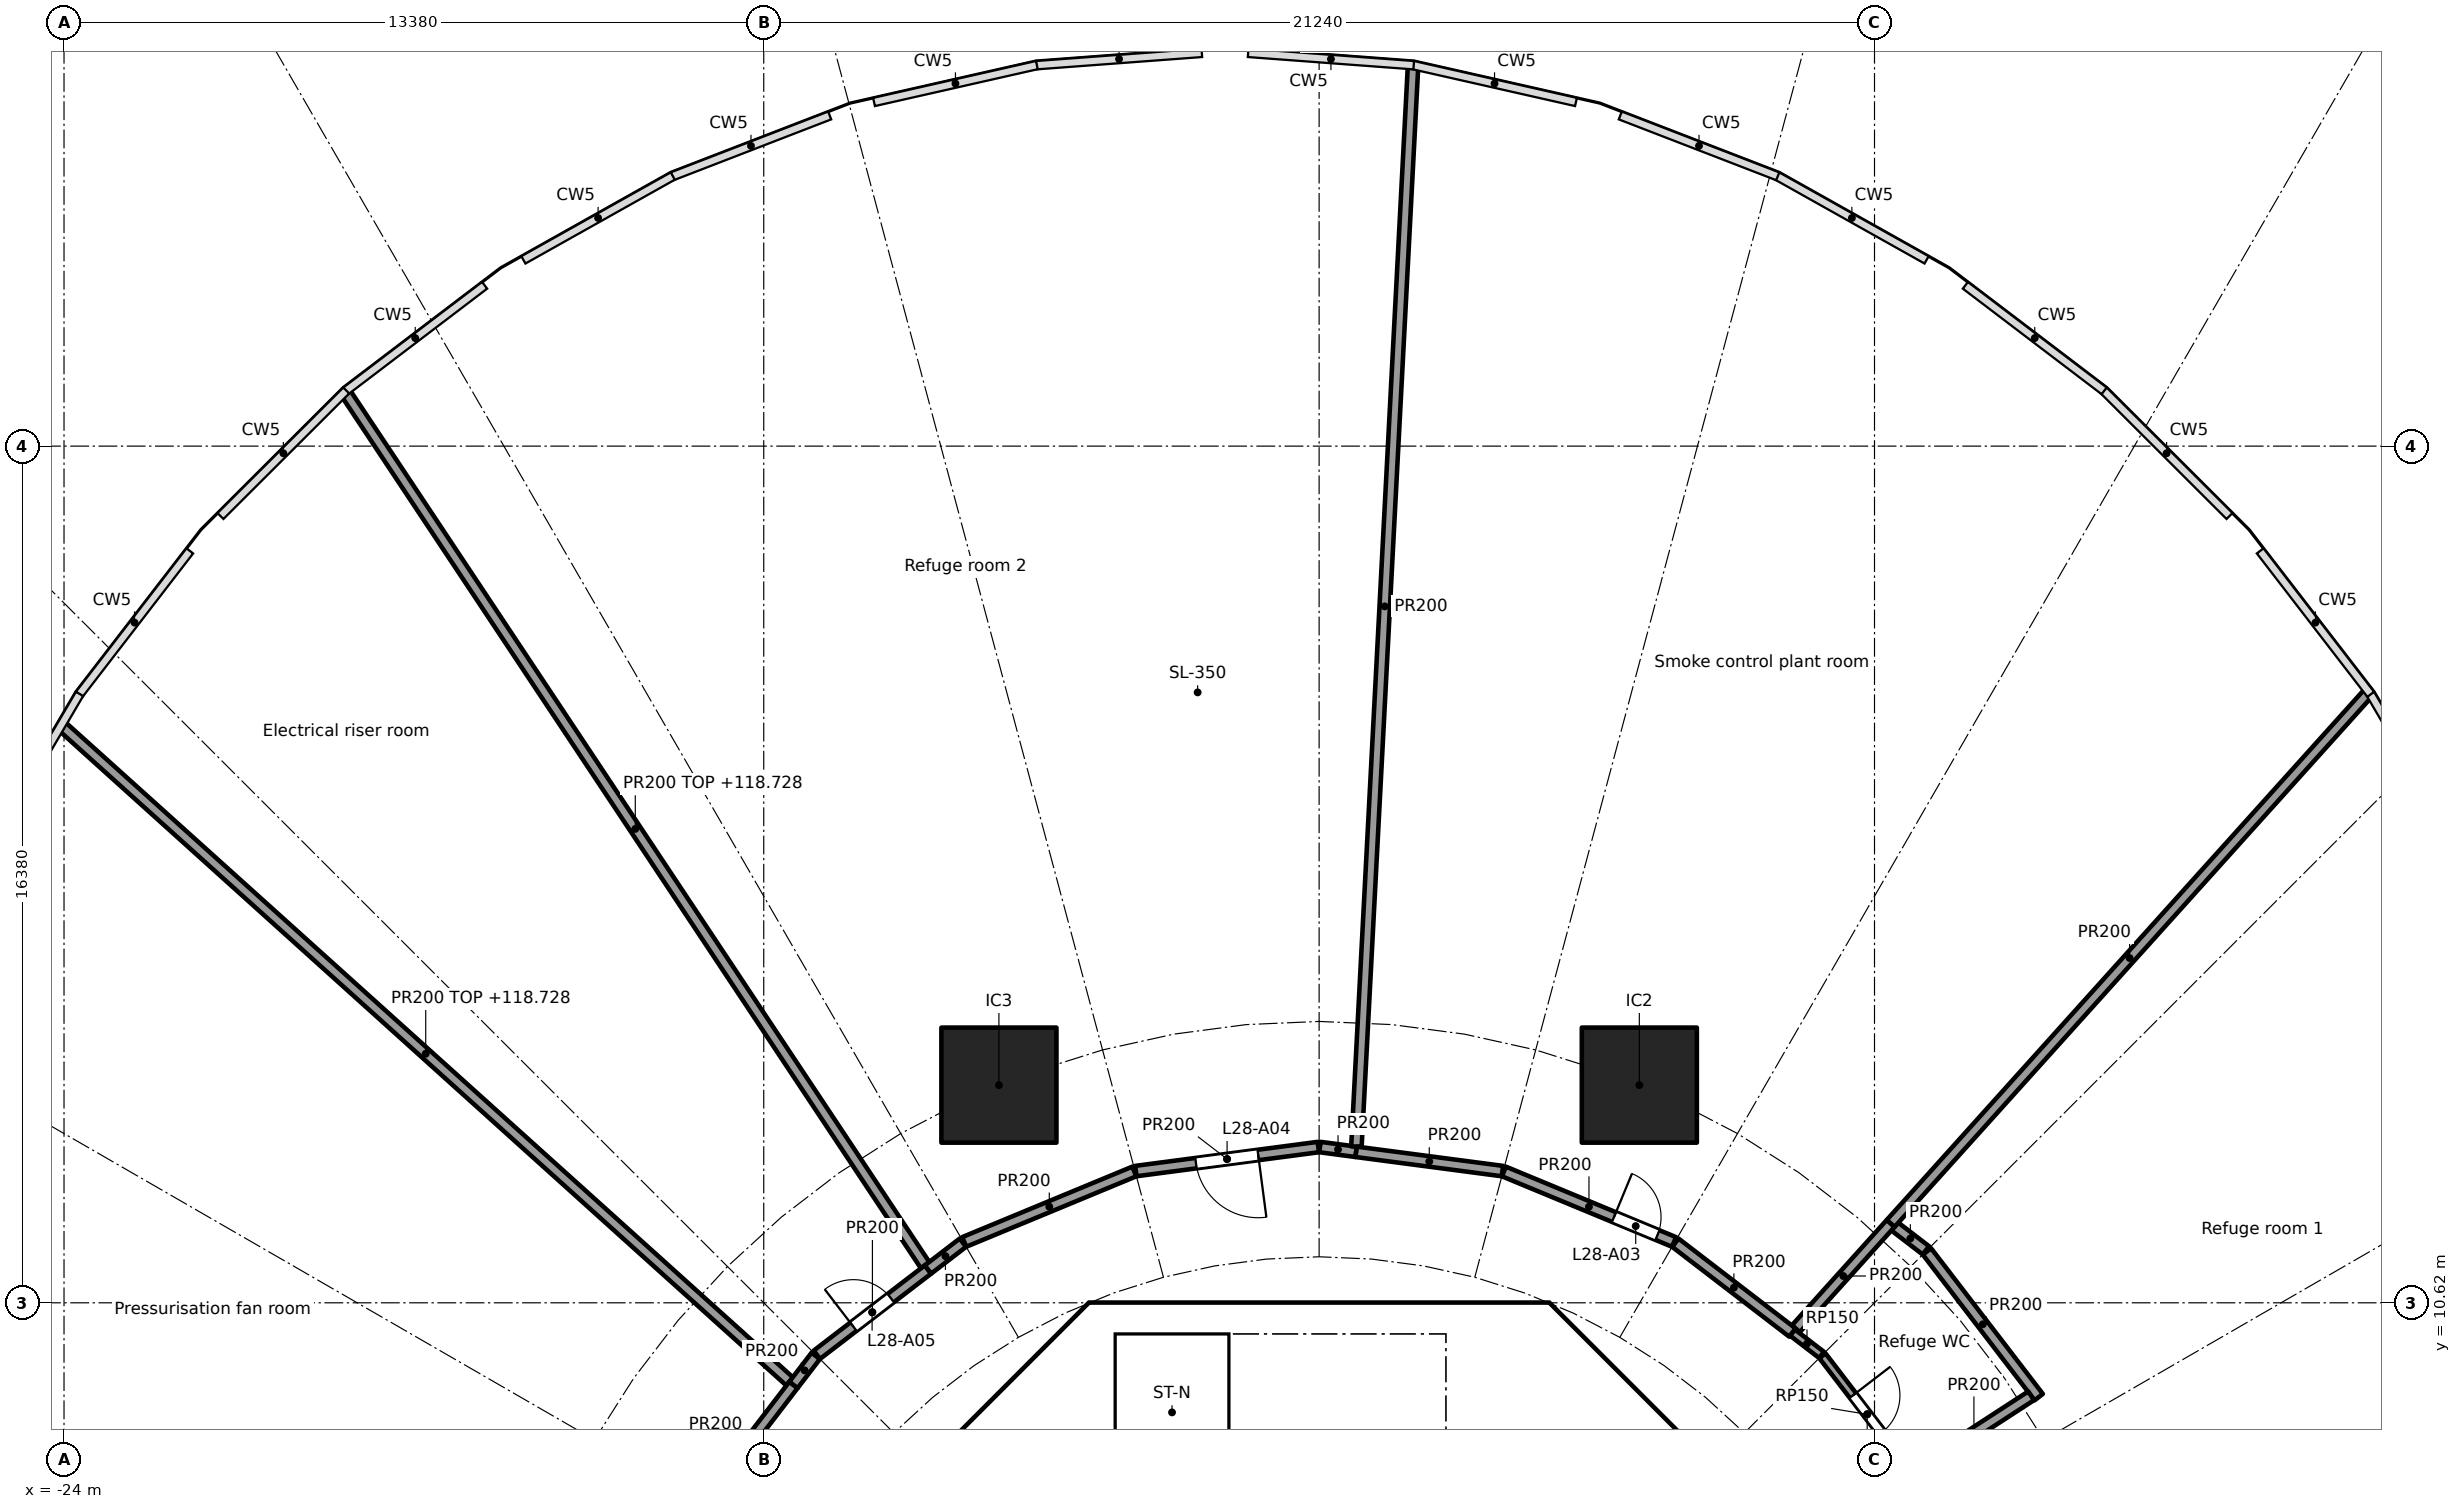
"""IFC4 building model, lengths in metres.
Left out: names, types, materials, properties, quantities, classifications, styles, units other than length and angle.
Written with IfcOpenShell. Run it as: python <this file> out.ifc"""

import sys

from ifc_helpers import new_model, si_unit, direction, frame, frame_2d, origin, origin_2d, place, context, subcontext, project, spatial, polyline, rectangle, outline, extrude, element, fill, save


model = new_model("IFC4")
c1 = context("Model", 3, precision=1e-05, world=origin(), true_north=direction((0.0, 1.0)))
c2 = subcontext(c1, "Body", "Model", "MODEL_VIEW")
j1 = project(units=[si_unit("LENGTHUNIT", "METRE"), si_unit("PLANEANGLEUNIT", "RADIAN")], contexts=[c1])
p1 = place(None, origin())
s1 = spatial("IfcSite", under=j1, at=p1, CompositionType="ELEMENT")
p2 = place(p1, origin())
s2 = spatial("IfcBuilding", under=s1, at=p2, CompositionType="ELEMENT")
p3 = place(p2, frame((0.0, 0.0, 114.0)))
s3 = spatial("IfcBuildingStorey", under=s2, at=p3, CompositionType="ELEMENT", Elevation=114.0)
for number, where, z_axis, x_axis in (
    (1, (6.123, 14.782, 0.0), (0.0, 0.0, 1.0), (1.0, 0.0, 0.0)),
    (2, (-6.123, 14.782, 0.0), (0.0, 0.0, 1.0), (1.0, 0.0, 0.0)),
):
    element("IfcColumn", number, at=place(p3, frame(where, z_axis=z_axis, x_axis=x_axis)), inside=s3, PredefinedType="COLUMN", context=c2, shape_type="SweptSolid", body=[
        extrude(rectangle(XDim=2.2, YDim=2.2, at=origin_2d()), origin(), (0.0, 0.0, 1.0), 5.6),
    ])
p4 = place(p3, frame((9.988, 4.613, 0.0), z_axis=(0.0, 0.0, 1.0), x_axis=(-0.707106781187, 0.707106781187, 0.0)))
e3 = element("IfcWall", 3, at=p4, inside=s3, PredefinedType="SHEAR", context=c2, shape_type="SweptSolid", body=[
    extrude(rectangle(XDim=7.602, YDim=0.6, at=frame_2d((3.801, 0.0))), origin(), (0.0, 0.0, 1.0), 5.34),
])
p5 = place(p4, frame((3.201, 0.0, 0.0)))
e4 = element("IfcOpeningElement", 4, at=p5, cuts=e3, PredefinedType="OPENING", context=c2, shape_type="SweptSolid", body=[
    extrude(rectangle(XDim=1.2, YDim=2.1, at=frame_2d((0.6, 1.05))), frame((0.0, 0.31, 0.0), z_axis=(0.0, -1.0, 0.0), x_axis=(1.0, 0.0, 0.0)), (0.0, 0.0, 1.0), 0.62),
])
p6 = place(p3, frame((-4.613, 9.988, 0.0), z_axis=(0.0, 0.0, 1.0), x_axis=(-0.707106781187, -0.707106781187, 0.0)))
e5 = element("IfcWall", 5, at=p6, inside=s3, PredefinedType="SHEAR", context=c2, shape_type="SweptSolid", body=[
    extrude(rectangle(XDim=7.602, YDim=0.6, at=frame_2d((3.801, 0.0))), origin(), (0.0, 0.0, 1.0), 5.34),
])
p7 = place(p6, frame((0.351, 0.0, 0.0)))
e6 = element("IfcOpeningElement", 6, at=p7, cuts=e5, PredefinedType="OPENING", context=c2, shape_type="SweptSolid", body=[
    extrude(rectangle(XDim=1.1, YDim=2.1, at=frame_2d((0.55, 1.05))), frame((0.0, 0.31, 0.0), z_axis=(0.0, -1.0, 0.0), x_axis=(1.0, 0.0, 0.0)), (0.0, 0.0, 1.0), 0.62),
])
p8 = place(p3, frame((-5.8, 4.3, 0.0), z_axis=(0.0, 0.0, 1.0), x_axis=(0.0, 1.0, 0.0)))
e7 = element("IfcWall", 7, at=p8, inside=s3, PredefinedType="PARTITIONING", context=c2, shape_type="SweptSolid", body=[
    extrude(rectangle(XDim=3.927, YDim=0.15, at=frame_2d((1.963, 0.0))), origin(), (0.0, 0.0, 1.0), 5.34),
])
p9 = place(p8, frame((1.551, 0.0, 0.0)))
e8 = element("IfcOpeningElement", 8, at=p9, cuts=e7, PredefinedType="OPENING", context=c2, shape_type="SweptSolid", body=[
    extrude(rectangle(XDim=0.9, YDim=2.1, at=frame_2d((0.45, 1.05))), frame((0.0, 0.085, 0.0), z_axis=(0.0, -1.0, 0.0), x_axis=(1.0, 0.0, 0.0)), (0.0, 0.0, 1.0), 0.17),
])
p10 = place(p3, frame((4.0, 7.025, 0.0), z_axis=(0.0, 0.0, 1.0), x_axis=(0.0, 1.0, 0.0)))
e9 = element("IfcWall", 9, at=p10, inside=s3, PredefinedType="SOLIDWALL", context=c2, shape_type="SweptSolid", body=[
    extrude(rectangle(XDim=3.0, YDim=0.2, at=frame_2d((1.5, 0.0))), origin(), (0.0, 0.0, 1.0), 5.34),
])
p11 = place(p10, frame((0.925, 0.0, 0.0)))
e10 = element("IfcOpeningElement", 10, at=p11, cuts=e9, PredefinedType="OPENING", context=c2, shape_type="SweptSolid", body=[
    extrude(rectangle(XDim=1.1, YDim=2.1, at=frame_2d((0.55, 1.05))), frame((0.0, 0.11, 0.0), z_axis=(0.0, -1.0, 0.0), x_axis=(1.0, 0.0, 0.0)), (0.0, 0.0, 1.0), 0.22),
])
p12 = place(p3, origin())
e11 = element("IfcWall", 11, at=p12, inside=s3, PredefinedType="SHEAR", context=c2, shape_type="SweptSolid", body=[
    extrude(outline(polyline([(-4.152, 10.025), (-4.401, 9.776), (-4.825, 10.2), (-4.401, 10.625), (4.401, 10.625), (4.825, 10.2), (4.401, 9.776), (4.152, 10.025), (-4.152, 10.025)])), origin(), (0.0, 0.0, 1.0), 5.34),
])
p13 = place(p3, origin())
e12 = element("IfcWall", 12, at=p13, inside=s3, PredefinedType="SOLIDWALL", context=c2, shape_type="SweptSolid", body=[
    extrude(outline(polyline([(-3.9, 7.025), (-4.1, 7.025), (-4.1, 10.025), (-3.9, 10.025), (-3.9, 7.025)])), origin(), (0.0, 0.0, 1.0), 5.34),
])
p14 = place(p3, frame((9.05, 10.051, 0.0), z_axis=(0.0, 0.0, 1.0), x_axis=(0.793399175387, -0.608701690893, 0.0)))
e13 = element("IfcWall", 13, at=p14, inside=s3, PredefinedType="PARTITIONING", context=c2, shape_type="SweptSolid", body=[
    extrude(rectangle(XDim=0.702, YDim=0.15, at=frame_2d((0.351, 0.0))), origin(), (0.0, 0.0, 1.0), 5.34),
])
p15 = place(p3, frame((9.624, 9.607, 0.0), z_axis=(0.0, 0.0, 1.0), x_axis=(0.608732750311, -0.793375345407, 0.0)))
e14 = element("IfcWall", 14, at=p15, inside=s3, PredefinedType="PARTITIONING", context=c2, shape_type="SweptSolid", body=[
    extrude(rectangle(XDim=2.824, YDim=0.15, at=frame_2d((1.412, 0.0))), origin(), (0.0, 0.0, 1.0), 5.34),
])
p16 = place(p15, frame((0.956, 0.0, 0.0)))
e15 = element("IfcOpeningElement", 15, at=p16, cuts=e14, PredefinedType="OPENING", context=c2, shape_type="SweptSolid", body=[
    extrude(rectangle(XDim=0.9, YDim=2.1, at=frame_2d((0.45, 1.05))), frame((0.0, 0.085, 0.0), z_axis=(0.0, -1.0, 0.0), x_axis=(1.0, 0.0, 0.0)), (0.0, 0.0, 1.0), 0.17),
])
p17 = place(p3, frame((-11.769, 6.812, 0.0), z_axis=(0.0, 0.0, 1.0), x_axis=(0.608714921409, 0.793389024662, 0.0)))
e16 = element("IfcWall", 16, at=p17, inside=s3, PredefinedType="PARTITIONING", context=c2, shape_type="SweptSolid", body=[
    extrude(rectangle(XDim=2.821, YDim=0.2, at=frame_2d((1.411, 0.0))), origin(), (0.0, 0.0, 1.0), 5.34),
])
p18 = place(p3, frame((-10.126, 9.117, 0.0), z_axis=(0.0, 0.0, 1.0), x_axis=(-0.743152798172, 0.669121751679, 0.0)))
e17 = element("IfcWall", 17, at=p18, inside=s3, PredefinedType="PARTITIONING", context=c2, shape_type="SweptSolid", body=[
    extrude(rectangle(XDim=18.725, YDim=0.2, at=frame_2d((9.363, 0.0))), origin(), (0.0, 0.0, 1.0), 4.728),
])
p19 = place(p3, frame((-10.051, 9.05, 0.0), z_axis=(0.0, 0.0, 1.0), x_axis=(0.608629566887, 0.793454504248, 0.0)))
e18 = element("IfcWall", 18, at=p19, inside=s3, PredefinedType="PARTITIONING", context=c2, shape_type="SweptSolid", body=[
    extrude(rectangle(XDim=0.699, YDim=0.2, at=frame_2d((0.349, 0.0))), origin(), (0.0, 0.0, 1.0), 5.34),
])
p20 = place(p3, frame((-9.605, 9.626, 0.0), z_axis=(0.0, 0.0, 1.0), x_axis=(0.793412701193, 0.608684060564, 0.0)))
e19 = element("IfcWall", 19, at=p20, inside=s3, PredefinedType="PARTITIONING", context=c2, shape_type="SweptSolid", body=[
    extrude(rectangle(XDim=2.679, YDim=0.2, at=frame_2d((1.339, 0.0))), origin(), (0.0, 0.0, 1.0), 5.34),
])
p21 = place(p20, frame((0.882, 0.0, 0.0)))
e20 = element("IfcOpeningElement", 20, at=p21, cuts=e19, PredefinedType="OPENING", context=c2, shape_type="SweptSolid", body=[
    extrude(rectangle(XDim=0.9, YDim=2.1, at=frame_2d((0.45, 1.05))), frame((0.0, 0.11, 0.0), z_axis=(0.0, -1.0, 0.0), x_axis=(1.0, 0.0, 0.0)), (0.0, 0.0, 1.0), 0.22),
])
p22 = place(p3, frame((-7.535, 11.34, 0.0), z_axis=(0.0, 0.0, 1.0), x_axis=(-0.553405443997, 0.832912008891, 0.0)))
e21 = element("IfcWall", 21, at=p22, inside=s3, PredefinedType="PARTITIONING", context=c2, shape_type="SweptSolid", body=[
    extrude(rectangle(XDim=20.027, YDim=0.2, at=frame_2d((10.013, 0.0))), origin(), (0.0, 0.0, 1.0), 4.728),
])
p23 = place(p3, frame((-7.479, 11.257, 0.0), z_axis=(0.0, 0.0, 1.0), x_axis=(0.793368013161, 0.608742306476, 0.0)))
e22 = element("IfcWall", 22, at=p23, inside=s3, PredefinedType="PARTITIONING", context=c2, shape_type="SweptSolid", body=[
    extrude(rectangle(XDim=0.841, YDim=0.2, at=frame_2d((0.42, 0.0))), origin(), (0.0, 0.0, 1.0), 5.34),
])
p24 = place(p3, frame((-6.786, 11.784, 0.0), z_axis=(0.0, 0.0, 1.0), x_axis=(0.92386297064, 0.382723413813, 0.0)))
e23 = element("IfcWall", 23, at=p24, inside=s3, PredefinedType="PARTITIONING", context=c2, shape_type="SweptSolid", body=[
    extrude(rectangle(XDim=3.52, YDim=0.2, at=frame_2d((1.76, 0.0))), origin(), (0.0, 0.0, 1.0), 5.34),
])
p25 = place(p3, frame((-3.505, 13.139, 0.0), z_axis=(0.0, 0.0, 1.0), x_axis=(0.991452406768, 0.130468866457, 0.0)))
e24 = element("IfcWall", 24, at=p25, inside=s3, PredefinedType="PARTITIONING", context=c2, shape_type="SweptSolid", body=[
    extrude(rectangle(XDim=3.52, YDim=0.2, at=frame_2d((1.76, 0.0))), origin(), (0.0, 0.0, 1.0), 5.34),
])
p26 = place(p25, frame((1.16, 0.0, 0.0)))
e25 = element("IfcOpeningElement", 25, at=p26, cuts=e24, PredefinedType="OPENING", context=c2, shape_type="SweptSolid", body=[
    extrude(rectangle(XDim=1.2, YDim=2.1, at=frame_2d((0.6, 1.05))), frame((0.0, 0.11, 0.0), z_axis=(0.0, -1.0, 0.0), x_axis=(1.0, 0.0, 0.0)), (0.0, 0.0, 1.0), 0.22),
])
p27 = place(p3, frame((0.015, 13.598, 0.0), z_axis=(0.0, 0.0, 1.0), x_axis=(0.991473310532, -0.130309917135, 0.0)))
e26 = element("IfcWall", 26, at=p27, inside=s3, PredefinedType="PARTITIONING", context=c2, shape_type="SweptSolid", body=[
    extrude(rectangle(XDim=0.699, YDim=0.2, at=frame_2d((0.349, 0.0))), origin(), (0.0, 0.0, 1.0), 5.34),
])
p28 = place(p3, frame((0.713, 13.607, 0.0), z_axis=(0.0, 0.0, 1.0), x_axis=(0.05234202654, 0.998629216605, 0.0)))
e27 = element("IfcWall", 27, at=p28, inside=s3, PredefinedType="PARTITIONING", context=c2, shape_type="SweptSolid", body=[
    extrude(rectangle(XDim=20.686, YDim=0.2, at=frame_2d((10.343, 0.0))), origin(), (0.0, 0.0, 1.0), 5.34),
])
p29 = place(p3, frame((0.708, 13.507, 0.0), z_axis=(0.0, 0.0, 1.0), x_axis=(0.991447224467, -0.130508241489, 0.0)))
e28 = element("IfcWall", 28, at=p29, inside=s3, PredefinedType="PARTITIONING", context=c2, shape_type="SweptSolid", body=[
    extrude(rectangle(XDim=2.821, YDim=0.2, at=frame_2d((1.411, 0.0))), origin(), (0.0, 0.0, 1.0), 5.34),
])
p30 = place(p3, frame((3.534, 13.131, 0.0), z_axis=(0.0, 0.0, 1.0), x_axis=(0.92386297064, -0.382723413813, 0.0)))
e29 = element("IfcWall", 29, at=p30, inside=s3, PredefinedType="PARTITIONING", context=c2, shape_type="SweptSolid", body=[
    extrude(rectangle(XDim=3.52, YDim=0.2, at=frame_2d((1.76, 0.0))), origin(), (0.0, 0.0, 1.0), 5.34),
])
p31 = place(p30, frame((2.278, 0.0, 0.0)))
e30 = element("IfcOpeningElement", 30, at=p31, cuts=e29, PredefinedType="OPENING", context=c2, shape_type="SweptSolid", body=[
    extrude(rectangle(XDim=0.9, YDim=2.1, at=frame_2d((0.45, 1.05))), frame((0.0, 0.11, 0.0), z_axis=(0.0, -1.0, 0.0), x_axis=(1.0, 0.0, 0.0)), (0.0, 0.0, 1.0), 0.22),
])
p32 = place(p3, frame((6.812, 11.769, 0.0), z_axis=(0.0, 0.0, 1.0), x_axis=(0.793389024662, -0.608714921409, 0.0)))
e31 = element("IfcWall", 31, at=p32, inside=s3, PredefinedType="PARTITIONING", context=c2, shape_type="SweptSolid", body=[
    extrude(rectangle(XDim=2.821, YDim=0.2, at=frame_2d((1.411, 0.0))), origin(), (0.0, 0.0, 1.0), 5.34),
])
p33 = place(p3, frame((9.117, 10.126, 0.0), z_axis=(0.0, 0.0, 1.0), x_axis=(0.669134044303, 0.743141729925, 0.0)))
e32 = element("IfcWall", 32, at=p33, inside=s3, PredefinedType="PARTITIONING", context=c2, shape_type="SweptSolid", body=[
    extrude(rectangle(XDim=2.708, YDim=0.2, at=frame_2d((1.354, 0.0))), origin(), (0.0, 0.0, 1.0), 5.34),
])
p34 = place(p3, frame((11.009, 12.077, 0.0), z_axis=(0.0, 0.0, 1.0), x_axis=(0.793279942729, -0.608857070636, 0.0)))
e33 = element("IfcWall", 33, at=p34, inside=s3, PredefinedType="PARTITIONING", context=c2, shape_type="SweptSolid", body=[
    extrude(rectangle(XDim=0.747, YDim=0.2, at=frame_2d((0.373, 0.0))), origin(), (0.0, 0.0, 1.0), 5.34),
])
p35 = place(p3, frame((10.93, 12.138, 0.0), z_axis=(0.0, 0.0, 1.0), x_axis=(0.669115860496, 0.743158102447, 0.0)))
e34 = element("IfcWall", 34, at=p35, inside=s3, PredefinedType="PARTITIONING", context=c2, shape_type="SweptSolid", body=[
    extrude(rectangle(XDim=13.654, YDim=0.2, at=frame_2d((6.827, 0.0))), origin(), (0.0, 0.0, 1.0), 5.34),
])
p36 = place(p3, frame((11.623, 11.602, 0.0), z_axis=(0.0, 0.0, 1.0), x_axis=(0.608732263815, -0.79337571868, 0.0)))
e35 = element("IfcWall", 35, at=p36, inside=s3, PredefinedType="PARTITIONING", context=c2, shape_type="SweptSolid", body=[
    extrude(rectangle(XDim=3.51, YDim=0.2, at=frame_2d((1.755, 0.0))), origin(), (0.0, 0.0, 1.0), 5.34),
])
p37 = place(p3, frame((13.615, 8.842, 0.0), z_axis=(0.0, 0.0, 1.0), x_axis=(-0.838672390671, -0.544636228254, 0.0)))
e36 = element("IfcWall", 36, at=p37, inside=s3, PredefinedType="PARTITIONING", context=c2, shape_type="SweptSolid", body=[
    extrude(rectangle(XDim=2.608, YDim=0.2, at=frame_2d((1.304, 0.0))), origin(), (0.0, 0.0, 1.0), 5.34),
])
p38 = place(p3, frame((25.379, 8.246, 0.0), z_axis=(0.0, 0.0, 1.0), x_axis=(-0.951061815969, -0.309000683181, 0.0)))
e37 = element("IfcWall", 37, at=p38, inside=s3, PredefinedType="PARTITIONING", context=c2, shape_type="SweptSolid", body=[
    extrude(rectangle(XDim=13.06, YDim=0.2, at=frame_2d((6.53, 0.0))), origin(), (0.0, 0.0, 1.0), 5.34),
])
p39 = place(p11, origin())
e38 = element("IfcDoor", 38, at=p39, inside=s3, OperationType="SINGLE_SWING_LEFT", PredefinedType="DOOR", context=c2, shape_type="SweptSolid", body=[
    extrude(rectangle(XDim=1.1, YDim=2.1, at=frame_2d((0.55, 1.05))), frame((0.0, 0.025, 0.0), z_axis=(0.0, -1.0, 0.0), x_axis=(1.0, 0.0, 0.0)), (0.0, 0.0, 1.0), 0.05),
])
fill(e10, e38)
p40 = place(p7, origin())
e39 = element("IfcDoor", 39, at=p40, inside=s3, OperationType="SINGLE_SWING_RIGHT", PredefinedType="DOOR", context=c2, shape_type="SweptSolid", body=[
    extrude(rectangle(XDim=1.1, YDim=2.1, at=frame_2d((0.55, 1.05))), frame((0.0, 0.025, 0.0), z_axis=(0.0, -1.0, 0.0), x_axis=(1.0, 0.0, 0.0)), (0.0, 0.0, 1.0), 0.05),
])
fill(e6, e39)
p41 = place(p16, origin())
e40 = element("IfcDoor", 40, at=p41, inside=s3, OperationType="SINGLE_SWING_LEFT", PredefinedType="DOOR", context=c2, shape_type="SweptSolid", body=[
    extrude(rectangle(XDim=0.9, YDim=2.1, at=frame_2d((0.45, 1.05))), frame((0.0, 0.025, 0.0), z_axis=(0.0, -1.0, 0.0), x_axis=(1.0, 0.0, 0.0)), (0.0, 0.0, 1.0), 0.05),
])
fill(e15, e40)
p42 = place(p31, origin())
e41 = element("IfcDoor", 41, at=p42, inside=s3, OperationType="SINGLE_SWING_LEFT", PredefinedType="DOOR", context=c2, shape_type="SweptSolid", body=[
    extrude(rectangle(XDim=0.9, YDim=2.1, at=frame_2d((0.45, 1.05))), frame((0.0, 0.025, 0.0), z_axis=(0.0, -1.0, 0.0), x_axis=(1.0, 0.0, 0.0)), (0.0, 0.0, 1.0), 0.05),
])
fill(e30, e41)
p43 = place(p26, frame((1.2, 0.0, 0.0), x_axis=(-1.0, 0.0, 0.0)))
e42 = element("IfcDoor", 42, at=p43, inside=s3, OperationType="SINGLE_SWING_LEFT", PredefinedType="DOOR", context=c2, shape_type="SweptSolid", body=[
    extrude(rectangle(XDim=1.2, YDim=2.1, at=frame_2d((0.6, 1.05))), frame((0.0, 0.025, 0.0), z_axis=(0.0, -1.0, 0.0), x_axis=(1.0, 0.0, 0.0)), (0.0, 0.0, 1.0), 0.05),
])
fill(e25, e42)
p44 = place(p21, origin())
e43 = element("IfcDoor", 43, at=p44, inside=s3, OperationType="SINGLE_SWING_LEFT", PredefinedType="DOOR", context=c2, shape_type="SweptSolid", body=[
    extrude(rectangle(XDim=0.9, YDim=2.1, at=frame_2d((0.45, 1.05))), frame((0.0, 0.025, 0.0), z_axis=(0.0, -1.0, 0.0), x_axis=(1.0, 0.0, 0.0)), (0.0, 0.0, 1.0), 0.05),
])
fill(e20, e43)
save(model, sys.argv[1])
